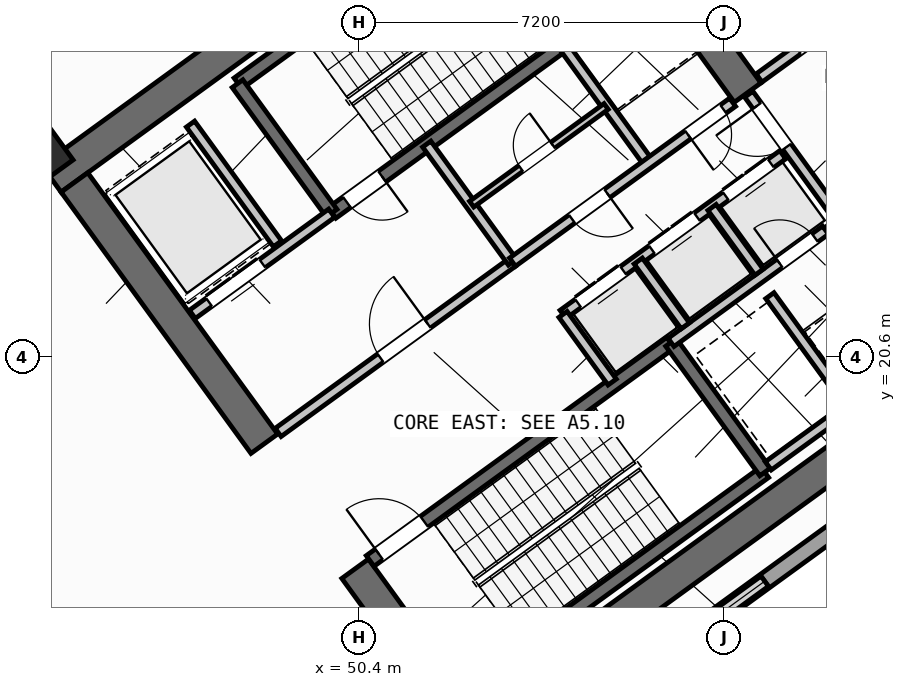
"""IFC4 building model, lengths in metres.
Left out: names, types, materials, properties, quantities, classifications, styles, units other than length and angle.
Written with IfcOpenShell. Run it as: python <this file> out.ifc"""

import sys

from ifc_helpers import new_model, si_unit, direction, frame, frame_2d, origin, origin_2d, place, context, subcontext, project, spatial, rectangle, hollow_rectangle, extrude, source, transform, mapped, element, fill, save


model = new_model("IFC4")
c1 = context("Model", 3, precision=1e-05, world=origin(), true_north=direction((0.0, 1.0)))
c2 = subcontext(c1, "Body", "Model", "MODEL_VIEW")
j1 = project(units=[si_unit("LENGTHUNIT", "METRE"), si_unit("PLANEANGLEUNIT", "RADIAN")], contexts=[c1])
p1 = place(None, origin())
s1 = spatial("IfcSite", under=j1, at=p1, CompositionType="ELEMENT")
p2 = place(p1, origin())
s2 = spatial("IfcBuilding", under=s1, at=p2, CompositionType="ELEMENT")
p3 = place(p2, frame((0.0, 0.0, 84.6)))
s3 = spatial("IfcBuildingStorey", under=s2, at=p3, CompositionType="ELEMENT", Elevation=84.6)
p4 = place(p3, frame((52.318, 13.11, 0.0), z_axis=(0.0, 0.0, 1.0), x_axis=(0.809019445368, 0.587781878776, 0.0)))
e1 = element("IfcWall", 1, at=p4, inside=s3, PredefinedType="SHEAR", context=c2, shape_type="SweptSolid", body=[
    extrude(rectangle(XDim=12.44, YDim=0.65, at=frame_2d((6.22, 0.0))), origin(), (0.0, 0.0, 1.0), 5.15),
])
p5 = place(p3, frame((44.325, 24.113, 0.0), z_axis=(0.0, 0.0, 1.0), x_axis=(0.809012664862, 0.58779121131, 0.0)))
e2 = element("IfcWall", 2, at=p5, inside=s3, PredefinedType="SHEAR", context=c2, shape_type="SweptSolid", body=[
    extrude(rectangle(XDim=12.44, YDim=0.65, at=frame_2d((6.22, 0.0))), origin(), (0.0, 0.0, 1.0), 5.15),
])
p6 = place(p3, frame((52.39, 13.564, 0.0), z_axis=(0.0, 0.0, 1.0), x_axis=(-0.58779688989, 0.809008539037, 0.0)))
e3 = element("IfcWall", 3, at=p6, inside=s3, PredefinedType="SHEAR", context=c2, shape_type="SweptSolid", body=[
    extrude(rectangle(XDim=3.525, YDim=0.65, at=frame_2d((1.763, 0.0))), origin(), (0.0, 0.0, 1.0), 5.15),
])
p7 = place(p3, frame((48.526, 18.884, 0.0), z_axis=(0.0, 0.0, 1.0), x_axis=(-0.58777996584, 0.809020835181, 0.0)))
e4 = element("IfcWall", 4, at=p7, inside=s3, PredefinedType="SHEAR", context=c2, shape_type="SweptSolid", body=[
    extrude(rectangle(XDim=6.375, YDim=0.65, at=frame_2d((3.188, 0.0))), origin(), (0.0, 0.0, 1.0), 5.15),
])
p8 = place(p3, frame((61.929, 20.494, 0.0), z_axis=(0.0, 0.0, 1.0), x_axis=(-0.58782982593, 0.808984607855, 0.0)))
e5 = element("IfcWall", 5, at=p8, inside=s3, PredefinedType="SHEAR", context=c2, shape_type="SweptSolid", body=[
    extrude(rectangle(XDim=3.525, YDim=0.65, at=frame_2d((1.762, 0.0))), origin(), (0.0, 0.0, 1.0), 5.15),
])
p9 = place(p3, frame((58.064, 25.813, 0.0), z_axis=(0.0, 0.0, 1.0), x_axis=(-0.58777996584, 0.809020835181, 0.0)))
e6 = element("IfcWall", 6, at=p9, inside=s3, PredefinedType="SHEAR", context=c2, shape_type="SweptSolid", body=[
    extrude(rectangle(XDim=6.375, YDim=0.65, at=frame_2d((3.188, 0.0))), origin(), (0.0, 0.0, 1.0), 5.15),
])
m1 = source(origin(), c2, "Body", "SweptSolid", [
    extrude(hollow_rectangle(XDim=0.9, YDim=0.9, WallThickness=0.036, at=origin_2d()), origin(), (0.0, 0.0, 1.0), 5.4),
])
p10 = place(p3, frame((44.124, 24.585, 0.0), z_axis=(0.0, 0.0, 1.0), x_axis=(0.809016994375, 0.587785252292, 0.0)))
e7 = element("IfcColumn", 7, at=p10, inside=s3, PredefinedType="COLUMN", context=c2, shape_type="MappedRepresentation", body=[
    mapped(m1, transform((0.0, 0.0, 0.0), scale=1.0)),
])
p11 = place(p3, frame((54.81, 40.5, 0.0), z_axis=(0.0, 0.0, 1.0), x_axis=(0.587783625747, -0.809018176127, 0.0)))
e8 = element("IfcWall", 8, at=p11, inside=s3, PredefinedType="STANDARD", context=c2, shape_type="SweptSolid", body=[
    extrude(rectangle(XDim=21.587, YDim=0.32, at=frame_2d((10.794, 0.0))), origin(), (0.0, 0.0, 1.0), 4.575),
])
p12 = place(p11, frame((9.619, 0.0, 0.95)))
e9 = element("IfcOpeningElement", 9, at=p12, cuts=e8, PredefinedType="OPENING", context=c2, shape_type="SweptSolid", body=[
    extrude(rectangle(XDim=1.25, YDim=1.4, at=frame_2d((0.625, 0.7))), frame((0.0, 0.17, 0.0), z_axis=(0.0, -1.0, 0.0), x_axis=(1.0, 0.0, 0.0)), (0.0, 0.0, 1.0), 0.34),
])
p13 = place(p11, frame((16.919, 0.0, 0.95)))
e10 = element("IfcOpeningElement", 10, at=p13, cuts=e8, PredefinedType="OPENING", context=c2, shape_type="SweptSolid", body=[
    extrude(rectangle(XDim=1.25, YDim=1.4, at=frame_2d((0.625, 0.7))), frame((0.0, 0.17, 0.0), z_axis=(0.0, -1.0, 0.0), x_axis=(1.0, 0.0, 0.0)), (0.0, 0.0, 1.0), 0.34),
])
p14 = place(p3, frame((67.454, 22.747, 0.0), z_axis=(0.0, 0.0, 1.0), x_axis=(-0.809021120468, -0.587779573171, 0.0)))
e11 = element("IfcWall", 11, at=p14, inside=s3, PredefinedType="STANDARD", context=c2, shape_type="SweptSolid", body=[
    extrude(rectangle(XDim=17.588, YDim=0.32, at=frame_2d((8.794, 0.0))), origin(), (0.0, 0.0, 1.0), 5.15),
])
p15 = place(p14, frame((2.169, 0.0, 0.95)))
e12 = element("IfcOpeningElement", 12, at=p15, cuts=e11, PredefinedType="OPENING", context=c2, shape_type="SweptSolid", body=[
    extrude(rectangle(XDim=1.25, YDim=1.4, at=frame_2d((0.625, 0.7))), frame((0.0, 0.17, 0.0), z_axis=(0.0, -1.0, 0.0), x_axis=(1.0, 0.0, 0.0)), (0.0, 0.0, 1.0), 0.34),
])
p16 = place(p14, frame((11.169, 0.0, 0.95)))
e13 = element("IfcOpeningElement", 13, at=p16, cuts=e11, PredefinedType="OPENING", context=c2, shape_type="SweptSolid", body=[
    extrude(rectangle(XDim=1.25, YDim=1.4, at=frame_2d((0.625, 0.7))), frame((0.0, 0.17, 0.0), z_axis=(0.0, -1.0, 0.0), x_axis=(1.0, 0.0, 0.0)), (0.0, 0.0, 1.0), 0.34),
])
p17 = place(p3, frame((48.006, 25.996, 0.0), z_axis=(0.0, 0.0, 1.0), x_axis=(0.80901903764, 0.587782439969, 0.0)))
e14 = element("IfcWall", 14, at=p17, inside=s3, PredefinedType="SHEAR", context=c2, shape_type="SweptSolid", body=[
    extrude(rectangle(XDim=7.46, YDim=0.26, at=frame_2d((3.73, 0.0))), origin(), (0.0, 0.0, 1.0), 5.15),
])
p18 = place(p3, frame((49.863, 23.44, 0.0), z_axis=(0.0, 0.0, 1.0), x_axis=(0.809003474932, 0.587803859759, 0.0)))
e15 = element("IfcWall", 15, at=p18, inside=s3, PredefinedType="SHEAR", context=c2, shape_type="SweptSolid", body=[
    extrude(rectangle(XDim=7.46, YDim=0.26, at=frame_2d((3.73, 0.0))), origin(), (0.0, 0.0, 1.0), 5.15),
])
p19 = place(p18, frame((0.36, 0.0, 0.0)))
e16 = element("IfcOpeningElement", 16, at=p19, cuts=e15, PredefinedType="OPENING", context=c2, shape_type="SweptSolid", body=[
    extrude(rectangle(XDim=0.86, YDim=2.05, at=frame_2d((0.43, 1.025))), frame((0.0, 0.14, 0.0), z_axis=(0.0, -1.0, 0.0), x_axis=(1.0, 0.0, 0.0)), (0.0, 0.0, 1.0), 0.28),
])
p20 = place(p3, frame((49.855, 23.434, 0.0), z_axis=(0.0, 0.0, 1.0), x_axis=(-0.58776738483, 0.809029975545, 0.0)))
e17 = element("IfcWall", 17, at=p20, inside=s3, PredefinedType="SHEAR", context=c2, shape_type="SweptSolid", body=[
    extrude(rectangle(XDim=3.16, YDim=0.26, at=frame_2d((1.58, 0.0))), origin(), (0.0, 0.0, 1.0), 5.15),
])
p21 = place(p3, frame((52.472, 14.013, 0.0), z_axis=(0.0, 0.0, 1.0), x_axis=(0.809028366311, 0.587769599847, 0.0)))
e18 = element("IfcWall", 18, at=p21, inside=s3, PredefinedType="SHEAR", context=c2, shape_type="SweptSolid", body=[
    extrude(rectangle(XDim=7.33, YDim=0.26, at=frame_2d((3.665, 0.0))), origin(), (0.0, 0.0, 1.0), 5.15),
])
p22 = place(p3, frame((50.615, 16.57, 0.0), z_axis=(0.0, 0.0, 1.0), x_axis=(0.809028366311, 0.587769599847, 0.0)))
e19 = element("IfcWall", 19, at=p22, inside=s3, PredefinedType="SHEAR", context=c2, shape_type="SweptSolid", body=[
    extrude(rectangle(XDim=7.33, YDim=0.26, at=frame_2d((3.665, 0.0))), origin(), (0.0, 0.0, 1.0), 5.15),
])
p23 = place(p22, frame((0.22, 0.0, 0.0)))
e20 = element("IfcOpeningElement", 20, at=p23, cuts=e19, PredefinedType="OPENING", context=c2, shape_type="SweptSolid", body=[
    extrude(rectangle(XDim=1.1, YDim=2.1, at=frame_2d((0.55, 1.05))), frame((0.0, 0.14, 0.0), z_axis=(0.0, -1.0, 0.0), x_axis=(1.0, 0.0, 0.0)), (0.0, 0.0, 1.0), 0.28),
])
p24 = place(p3, frame((58.41, 18.327, 0.0), z_axis=(0.0, 0.0, 1.0), x_axis=(-0.58776738483, 0.809029975545, 0.0)))
e21 = element("IfcWall", 21, at=p24, inside=s3, PredefinedType="SHEAR", context=c2, shape_type="SweptSolid", body=[
    extrude(rectangle(XDim=3.16, YDim=0.26, at=frame_2d((1.58, 0.0))), origin(), (0.0, 0.0, 1.0), 5.15),
])
p25 = place(p3, frame((47.106, 21.437, 0.0), z_axis=(0.0, 0.0, 1.0), x_axis=(0.809012514015, 0.58779141893, 0.0)))
e22 = element("IfcWall", 22, at=p25, inside=s3, PredefinedType="STANDARD", context=c2, shape_type="SweptSolid", body=[
    extrude(rectangle(XDim=3.398, YDim=0.2, at=frame_2d((1.699, 0.0))), origin(), (0.0, 0.0, 1.0), 5.14),
])
p26 = place(p25, frame((0.408, 0.0, 0.0)))
e23 = element("IfcOpeningElement", 23, at=p26, cuts=e22, PredefinedType="OPENING", context=c2, shape_type="SweptSolid", body=[
    extrude(rectangle(XDim=1.3, YDim=2.2, at=frame_2d((0.65, 1.1))), frame((0.0, 0.11, 0.0), z_axis=(0.0, -1.0, 0.0), x_axis=(1.0, 0.0, 0.0)), (0.0, 0.0, 1.0), 0.22),
])
p27 = place(p3, frame((48.799, 19.107, 0.0), z_axis=(0.0, 0.0, 1.0), x_axis=(0.809012959416, 0.587790805897, 0.0)))
e24 = element("IfcWall", 24, at=p27, inside=s3, PredefinedType="STANDARD", context=c2, shape_type="SweptSolid", body=[
    extrude(rectangle(XDim=5.718, YDim=0.2, at=frame_2d((2.859, 0.0))), origin(), (0.0, 0.0, 1.0), 5.14),
])
p28 = place(p27, frame((2.498, 0.0, 0.0)))
e25 = element("IfcOpeningElement", 25, at=p28, cuts=e24, PredefinedType="OPENING", context=c2, shape_type="SweptSolid", body=[
    extrude(rectangle(XDim=1.15, YDim=2.1, at=frame_2d((0.575, 1.05))), frame((0.0, 0.11, 0.0), z_axis=(0.0, -1.0, 0.0), x_axis=(1.0, 0.0, 0.0)), (0.0, 0.0, 1.0), 0.22),
])
p29 = place(p3, frame((56.553, 20.884, 0.0), z_axis=(0.0, 0.0, 1.0), x_axis=(0.809035789462, 0.587759382205, 0.0)))
e26 = element("IfcWall", 26, at=p29, inside=s3, PredefinedType="STANDARD", context=c2, shape_type="SweptSolid", body=[
    extrude(rectangle(XDim=3.768, YDim=0.2, at=frame_2d((1.884, 0.0))), origin(), (0.0, 0.0, 1.0), 5.14),
])
p30 = place(p29, frame((2.65, 0.0, 0.0)))
e27 = element("IfcOpeningElement", 27, at=p30, cuts=e26, PredefinedType="OPENING", context=c2, shape_type="SweptSolid", body=[
    extrude(rectangle(XDim=0.86, YDim=2.05, at=frame_2d((0.43, 1.025))), frame((0.0, 0.11, 0.0), z_axis=(0.0, -1.0, 0.0), x_axis=(1.0, 0.0, 0.0)), (0.0, 0.0, 1.0), 0.22),
])
p31 = place(p3, frame((54.421, 21.436, 0.0), z_axis=(0.0, 0.0, 1.0), x_axis=(0.809013710463, 0.587789772183, 0.0)))
e28 = element("IfcWall", 28, at=p31, inside=s3, PredefinedType="STANDARD", context=c2, shape_type="SweptSolid", body=[
    extrude(rectangle(XDim=5.36, YDim=0.2, at=frame_2d((2.68, 0.0))), origin(), (0.0, 0.0, 1.0), 5.14),
])
p32 = place(p31, frame((0.37, 0.0, 0.0)))
e29 = element("IfcOpeningElement", 29, at=p32, cuts=e28, PredefinedType="OPENING", context=c2, shape_type="SweptSolid", body=[
    extrude(rectangle(XDim=1.1, YDim=2.15, at=frame_2d((0.55, 1.075))), frame((0.0, 0.11, 0.0), z_axis=(0.0, -1.0, 0.0), x_axis=(1.0, 0.0, 0.0)), (0.0, 0.0, 1.0), 0.22),
])
p33 = place(p31, frame((2.17, 0.0, 0.0)))
e30 = element("IfcOpeningElement", 30, at=p33, cuts=e28, PredefinedType="OPENING", context=c2, shape_type="SweptSolid", body=[
    extrude(rectangle(XDim=1.1, YDim=2.15, at=frame_2d((0.55, 1.075))), frame((0.0, 0.11, 0.0), z_axis=(0.0, -1.0, 0.0), x_axis=(1.0, 0.0, 0.0)), (0.0, 0.0, 1.0), 0.22),
])
p34 = place(p31, frame((3.97, 0.0, 0.0)))
e31 = element("IfcOpeningElement", 31, at=p34, cuts=e28, PredefinedType="OPENING", context=c2, shape_type="SweptSolid", body=[
    extrude(rectangle(XDim=1.1, YDim=2.15, at=frame_2d((0.55, 1.075))), frame((0.0, 0.11, 0.0), z_axis=(0.0, -1.0, 0.0), x_axis=(1.0, 0.0, 0.0)), (0.0, 0.0, 1.0), 0.22),
])
p35 = place(p3, frame((55.391, 20.102, 0.0), z_axis=(0.0, 0.0, 1.0), x_axis=(-0.58778447739, 0.809017557374, 0.0)))
e32 = element("IfcWall", 32, at=p35, inside=s3, PredefinedType="STANDARD", context=c2, shape_type="SweptSolid", body=[
    extrude(rectangle(XDim=1.65, YDim=0.2, at=frame_2d((0.825, 0.0))), origin(), (0.0, 0.0, 1.0), 5.14),
])
p36 = place(p3, frame((48.786, 22.83, 0.0), z_axis=(0.0, 0.0, 1.0), x_axis=(-0.587783856777, 0.809018008275, 0.0)))
e33 = element("IfcWall", 33, at=p36, inside=s3, PredefinedType="STANDARD", context=c2, shape_type="SweptSolid", body=[
    extrude(rectangle(XDim=2.92, YDim=0.2, at=frame_2d((1.46, 0.0))), origin(), (0.0, 0.0, 1.0), 5.14),
])
p37 = place(p3, frame((56.834, 21.212, 0.0), z_axis=(0.0, 0.0, 1.0), x_axis=(-0.58776738483, 0.809029975545, 0.0)))
e34 = element("IfcWall", 34, at=p37, inside=s3, PredefinedType="STANDARD", context=c2, shape_type="SweptSolid", body=[
    extrude(rectangle(XDim=1.58, YDim=0.2, at=frame_2d((0.79, 0.0))), origin(), (0.0, 0.0, 1.0), 5.14),
])
p38 = place(p3, frame((58.29, 22.27, 0.0), z_axis=(0.0, 0.0, 1.0), x_axis=(-0.587840865826, 0.808976585857, 0.0)))
e35 = element("IfcWall", 35, at=p38, inside=s3, PredefinedType="STANDARD", context=c2, shape_type="SweptSolid", body=[
    extrude(rectangle(XDim=1.58, YDim=0.2, at=frame_2d((0.79, 0.0))), origin(), (0.0, 0.0, 1.0), 5.14),
])
p39 = place(p3, frame((60.067, 19.655, 0.0), z_axis=(0.0, 0.0, 1.0), x_axis=(-0.587800520745, 0.809005900975, 0.0)))
e36 = element("IfcWall", 36, at=p39, inside=s3, PredefinedType="STANDARD", context=c2, shape_type="SweptSolid", body=[
    extrude(rectangle(XDim=2.66, YDim=0.2, at=frame_2d((1.33, 0.0))), origin(), (0.0, 0.0, 1.0), 5.14),
])
p40 = place(p3, frame((58.472, 18.447, 0.0), z_axis=(0.0, 0.0, 1.0), x_axis=(0.809022487728, 0.587777691266, 0.0)))
e37 = element("IfcWall", 37, at=p40, inside=s3, PredefinedType="STANDARD", context=c2, shape_type="SweptSolid", body=[
    extrude(rectangle(XDim=3.648, YDim=0.2, at=frame_2d((1.824, 0.0))), origin(), (0.0, 0.0, 1.0), 5.14),
])
p41 = place(p3, frame((53.425, 22.468, 0.0), z_axis=(0.0, 0.0, 1.0), x_axis=(-0.5877230039, 0.809062216821, 0.0)))
e38 = element("IfcWall", 38, at=p41, inside=s3, PredefinedType="STANDARD", context=c2, shape_type="SweptSolid", body=[
    extrude(rectangle(XDim=2.88, YDim=0.2, at=frame_2d((1.44, 0.0))), origin(), (0.0, 0.0, 1.0), 5.14),
])
p42 = place(p3, frame((56.111, 24.419, 0.0), z_axis=(0.0, 0.0, 1.0), x_axis=(-0.58777848983, 0.809021907548, 0.0)))
e39 = element("IfcWall", 39, at=p42, inside=s3, PredefinedType="STANDARD", context=c2, shape_type="SweptSolid", body=[
    extrude(rectangle(XDim=2.88, YDim=0.2, at=frame_2d((1.44, 0.0))), origin(), (0.0, 0.0, 1.0), 5.14),
])
p43 = place(p3, frame((53.425, 22.468, 0.0), z_axis=(0.0, 0.0, 1.0), x_axis=(0.80902705128, 0.587771409902, 0.0)))
e40 = element("IfcWall", 40, at=p43, inside=s3, PredefinedType="STANDARD", context=c2, shape_type="SweptSolid", body=[
    extrude(rectangle(XDim=5.368, YDim=0.2, at=frame_2d((2.684, 0.0))), origin(), (0.0, 0.0, 1.0), 5.14),
])
p44 = place(p43, frame((4.28, 0.0, 0.0)))
e41 = element("IfcOpeningElement", 41, at=p44, cuts=e40, PredefinedType="OPENING", context=c2, shape_type="SweptSolid", body=[
    extrude(rectangle(XDim=0.86, YDim=2.05, at=frame_2d((0.43, 1.025))), frame((0.0, 0.11, 0.0), z_axis=(0.0, -1.0, 0.0), x_axis=(1.0, 0.0, 0.0)), (0.0, 0.0, 1.0), 0.22),
])
p45 = place(p43, frame((1.45, 0.0, 0.0)))
e42 = element("IfcOpeningElement", 42, at=p45, cuts=e40, PredefinedType="OPENING", context=c2, shape_type="SweptSolid", body=[
    extrude(rectangle(XDim=0.86, YDim=2.05, at=frame_2d((0.43, 1.025))), frame((0.0, 0.11, 0.0), z_axis=(0.0, -1.0, 0.0), x_axis=(1.0, 0.0, 0.0)), (0.0, 0.0, 1.0), 0.22),
])
p46 = place(p3, frame((52.618, 23.612, 0.0), z_axis=(0.0, 0.0, 1.0), x_axis=(0.809009587469, 0.587795446889, 0.0)))
e43 = element("IfcWall", 43, at=p46, inside=s3, PredefinedType="PLUMBINGWALL", context=c2, shape_type="SweptSolid", body=[
    extrude(rectangle(XDim=3.28, YDim=0.14, at=frame_2d((1.64, 0.0))), origin(), (0.0, 0.0, 1.0), 5.14),
])
p47 = place(p46, frame((1.2, 0.0, 0.0)))
e44 = element("IfcOpeningElement", 44, at=p47, cuts=e43, PredefinedType="OPENING", context=c2, shape_type="SweptSolid", body=[
    extrude(rectangle(XDim=0.78, YDim=2.05, at=frame_2d((0.39, 1.025))), frame((0.0, 0.08, 0.0), z_axis=(0.0, -1.0, 0.0), x_axis=(1.0, 0.0, 0.0)), (0.0, 0.0, 1.0), 0.16),
])
p48 = place(p3, frame((59.827, 23.386, 0.0), z_axis=(0.0, 0.0, 1.0), x_axis=(-0.587803840107, 0.809003489211, 0.0)))
e45 = element("IfcWall", 45, at=p48, inside=s3, PredefinedType="STANDARD", context=c2, shape_type="SweptSolid", body=[
    extrude(rectangle(XDim=2.96, YDim=0.2, at=frame_2d((1.48, 0.0))), origin(), (0.0, 0.0, 1.0), 5.14),
])
p49 = place(p48, frame((1.68, 0.0, 0.0)))
e46 = element("IfcOpeningElement", 46, at=p49, cuts=e45, PredefinedType="OPENING", context=c2, shape_type="SweptSolid", body=[
    extrude(rectangle(XDim=1.0, YDim=2.1, at=frame_2d((0.5, 1.05))), frame((0.0, 0.11, 0.0), z_axis=(0.0, -1.0, 0.0), x_axis=(1.0, 0.0, 0.0)), (0.0, 0.0, 1.0), 0.22),
])
p50 = place(p3, frame((65.545, 23.956, 0.0), z_axis=(0.0, 0.0, 1.0), x_axis=(-0.587791199948, 0.809012673117, 0.0)))
e47 = element("IfcWall", 47, at=p50, inside=s3, PredefinedType="STANDARD", context=c2, shape_type="SweptSolid", body=[
    extrude(rectangle(XDim=11.6, YDim=0.2, at=frame_2d((5.8, 0.0))), origin(), (0.0, 0.0, 1.0), 5.14),
])
p51 = place(p3, frame((58.29, 26.101, 0.0), z_axis=(0.0, 0.0, 1.0), x_axis=(0.80902466346, 0.587774696557, 0.0)))
e48 = element("IfcWall", 48, at=p51, inside=s3, PredefinedType="STANDARD", context=c2, shape_type="SweptSolid", body=[
    extrude(rectangle(XDim=4.608, YDim=0.2, at=frame_2d((2.304, 0.0))), origin(), (0.0, 0.0, 1.0), 4.575),
])
p52 = place(p51, frame((0.948, 0.0, 0.0)))
e49 = element("IfcOpeningElement", 49, at=p52, cuts=e48, PredefinedType="OPENING", context=c2, shape_type="SweptSolid", body=[
    extrude(rectangle(XDim=1.25, YDim=2.15, at=frame_2d((0.625, 1.075))), frame((0.0, 0.11, 0.0), z_axis=(0.0, -1.0, 0.0), x_axis=(1.0, 0.0, 0.0)), (0.0, 0.0, 1.0), 0.22),
])
m2 = source(origin(), c2, "Body", "SweptSolid", [
    extrude(rectangle(XDim=1.25, YDim=1.4, at=frame_2d((0.625, 0.7))), frame((0.0, 0.03, 0.0), z_axis=(0.0, -1.0, 0.0), x_axis=(1.0, 0.0, 0.0)), (0.0, 0.0, 1.0), 0.06),
])
p53 = place(p16, origin())
e50 = element("IfcWindow", 50, at=p53, inside=s3, PartitioningType="SINGLE_PANEL", PredefinedType="WINDOW", context=c2, shape_type="MappedRepresentation", body=[
    mapped(m2, transform((0.0, 0.0, 0.0), scale=1.0)),
])
fill(e13, e50)
m3 = source(origin(), c2, "Body", "SweptSolid", [
    extrude(rectangle(XDim=0.86, YDim=2.05, at=frame_2d((0.43, 1.025))), frame((0.0, 0.025, 0.0), z_axis=(0.0, -1.0, 0.0), x_axis=(1.0, 0.0, 0.0)), (0.0, 0.0, 1.0), 0.05),
])
p54 = place(p19, frame((0.86, 0.0, 0.0), z_axis=(0.0, 0.0, 1.0), x_axis=(-1.0, 0.0, 0.0)))
e51 = element("IfcDoor", 51, at=p54, inside=s3, OperationType="SINGLE_SWING_LEFT", PredefinedType="DOOR", context=c2, shape_type="MappedRepresentation", body=[
    mapped(m3, transform((0.0, 0.0, 0.0), scale=1.0)),
])
fill(e16, e51)
m4 = source(origin(), c2, "Body", "SweptSolid", [
    extrude(rectangle(XDim=1.1, YDim=2.1, at=frame_2d((0.55, 1.05))), frame((0.0, 0.025, 0.0), z_axis=(0.0, -1.0, 0.0), x_axis=(1.0, 0.0, 0.0)), (0.0, 0.0, 1.0), 0.05),
])
p55 = place(p23, origin())
e52 = element("IfcDoor", 52, at=p55, inside=s3, OperationType="SINGLE_SWING_LEFT", PredefinedType="DOOR", context=c2, shape_type="MappedRepresentation", body=[
    mapped(m4, transform((0.0, 0.0, 0.0), scale=1.0)),
])
fill(e20, e52)
m5 = source(origin(), c2, "Body", "SweptSolid", [
    extrude(rectangle(XDim=1.15, YDim=2.1, at=frame_2d((0.575, 1.05))), frame((0.0, 0.025, 0.0), z_axis=(0.0, -1.0, 0.0), x_axis=(1.0, 0.0, 0.0)), (0.0, 0.0, 1.0), 0.05),
])
p56 = place(p28, origin())
e53 = element("IfcDoor", 53, at=p56, inside=s3, OperationType="SINGLE_SWING_RIGHT", PredefinedType="DOOR", context=c2, shape_type="MappedRepresentation", body=[
    mapped(m5, transform((0.0, 0.0, 0.0), scale=1.0)),
])
fill(e25, e53)
m6 = source(origin(), c2, "Body", "SweptSolid", [
    extrude(rectangle(XDim=1.3, YDim=2.2, at=frame_2d((0.65, 1.1))), frame((0.0, 0.025, 0.0), z_axis=(0.0, -1.0, 0.0), x_axis=(1.0, 0.0, 0.0)), (0.0, 0.0, 1.0), 0.05),
])
p57 = place(p26, origin())
e54 = element("IfcDoor", 54, at=p57, inside=s3, OperationType="DOUBLE_DOOR_SLIDING", PredefinedType="DOOR", context=c2, shape_type="MappedRepresentation", body=[
    mapped(m6, transform((0.0, 0.0, 0.0), scale=1.0)),
])
fill(e23, e54)
m7 = source(origin(), c2, "Body", "SweptSolid", [
    extrude(rectangle(XDim=1.1, YDim=2.15, at=frame_2d((0.55, 1.075))), frame((0.0, 0.025, 0.0), z_axis=(0.0, -1.0, 0.0), x_axis=(1.0, 0.0, 0.0)), (0.0, 0.0, 1.0), 0.05),
])
p58 = place(p32, origin())
e55 = element("IfcDoor", 55, at=p58, inside=s3, OperationType="DOUBLE_DOOR_SLIDING", PredefinedType="DOOR", context=c2, shape_type="MappedRepresentation", body=[
    mapped(m7, transform((0.0, 0.0, 0.0), scale=1.0)),
])
fill(e29, e55)
p59 = place(p33, origin())
e56 = element("IfcDoor", 56, at=p59, inside=s3, OperationType="DOUBLE_DOOR_SLIDING", PredefinedType="DOOR", context=c2, shape_type="MappedRepresentation", body=[
    mapped(m7, transform((0.0, 0.0, 0.0), scale=1.0)),
])
fill(e30, e56)
p60 = place(p34, origin())
e57 = element("IfcDoor", 57, at=p60, inside=s3, OperationType="DOUBLE_DOOR_SLIDING", PredefinedType="DOOR", context=c2, shape_type="MappedRepresentation", body=[
    mapped(m7, transform((0.0, 0.0, 0.0), scale=1.0)),
])
fill(e31, e57)
p61 = place(p30, origin())
e58 = element("IfcDoor", 58, at=p61, inside=s3, OperationType="SINGLE_SWING_LEFT", PredefinedType="DOOR", context=c2, shape_type="MappedRepresentation", body=[
    mapped(m3, transform((0.0, 0.0, 0.0), scale=1.0)),
])
fill(e27, e58)
p62 = place(p44, frame((0.86, 0.0, 0.0), z_axis=(0.0, 0.0, 1.0), x_axis=(-1.0, 0.0, 0.0)))
e59 = element("IfcDoor", 59, at=p62, inside=s3, OperationType="SINGLE_SWING_RIGHT", PredefinedType="DOOR", context=c2, shape_type="MappedRepresentation", body=[
    mapped(m3, transform((0.0, 0.0, 0.0), scale=1.0)),
])
fill(e41, e59)
p63 = place(p45, frame((0.86, 0.0, 0.0), z_axis=(0.0, 0.0, 1.0), x_axis=(-1.0, 0.0, 0.0)))
e60 = element("IfcDoor", 60, at=p63, inside=s3, OperationType="SINGLE_SWING_LEFT", PredefinedType="DOOR", context=c2, shape_type="MappedRepresentation", body=[
    mapped(m3, transform((0.0, 0.0, 0.0), scale=1.0)),
])
fill(e42, e60)
m8 = source(origin(), c2, "Body", "SweptSolid", [
    extrude(rectangle(XDim=0.78, YDim=2.05, at=frame_2d((0.39, 1.025))), frame((0.0, 0.025, 0.0), z_axis=(0.0, -1.0, 0.0), x_axis=(1.0, 0.0, 0.0)), (0.0, 0.0, 1.0), 0.05),
])
p64 = place(p47, origin())
e61 = element("IfcDoor", 61, at=p64, inside=s3, OperationType="SINGLE_SWING_RIGHT", PredefinedType="DOOR", context=c2, shape_type="MappedRepresentation", body=[
    mapped(m8, transform((0.0, 0.0, 0.0), scale=1.0)),
])
fill(e44, e61)
m9 = source(origin(), c2, "Body", "SweptSolid", [
    extrude(rectangle(XDim=1.0, YDim=2.1, at=frame_2d((0.5, 1.05))), frame((0.0, 0.025, 0.0), z_axis=(0.0, -1.0, 0.0), x_axis=(1.0, 0.0, 0.0)), (0.0, 0.0, 1.0), 0.05),
])
p65 = place(p49, origin())
e62 = element("IfcDoor", 62, at=p65, inside=s3, OperationType="SINGLE_SWING_RIGHT", PredefinedType="DOOR", context=c2, shape_type="MappedRepresentation", body=[
    mapped(m9, transform((0.0, 0.0, 0.0), scale=1.0)),
])
fill(e46, e62)
save(model, sys.argv[1])
